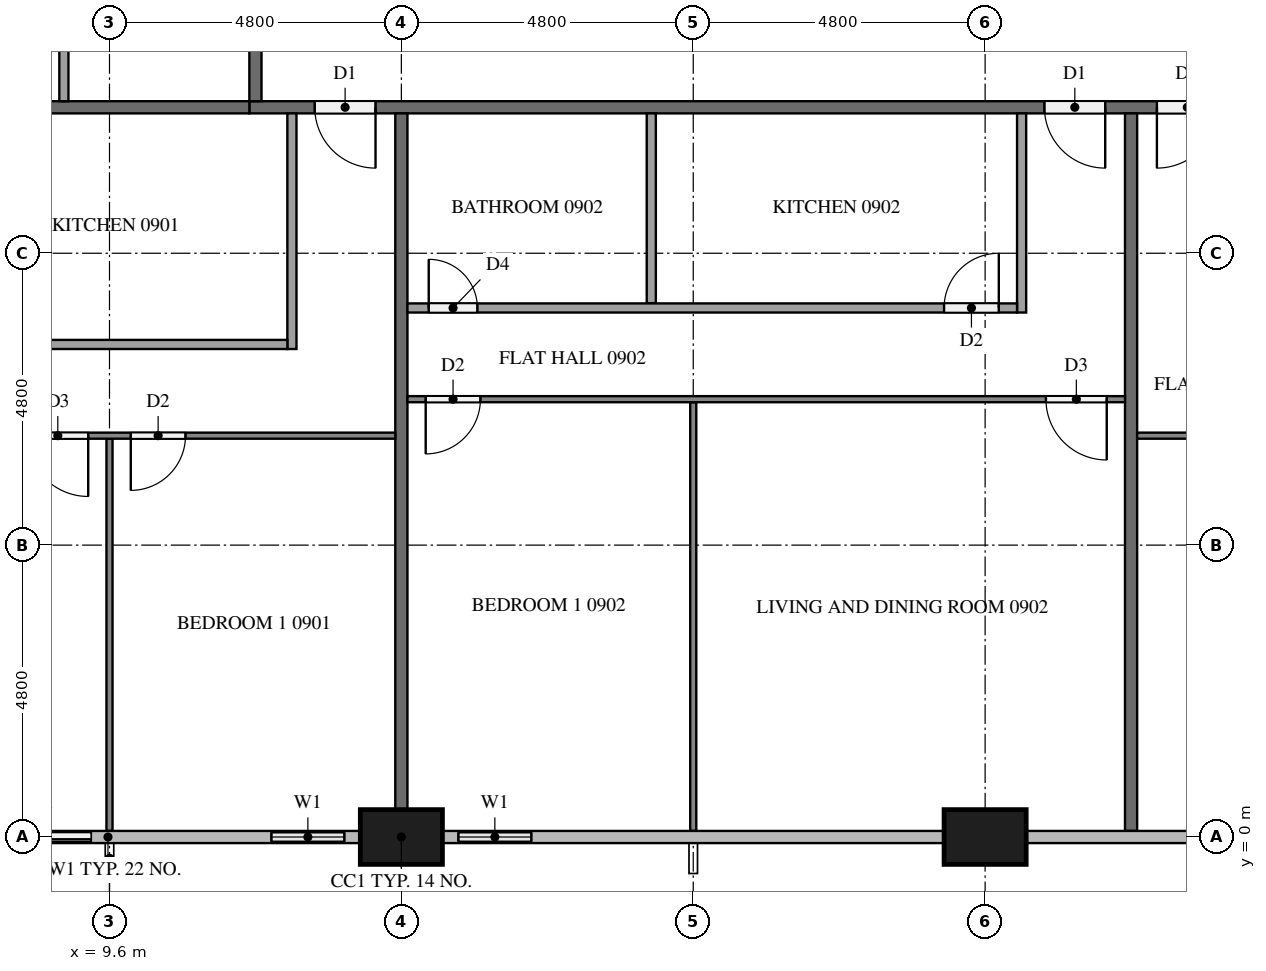
"""IFC4 building model, lengths in metres.
Left out: names, types, materials, properties, quantities, classifications, styles, units other than length and angle.
Written with IfcOpenShell. Run it as: python <this file> out.ifc"""

import sys

from ifc_helpers import new_model, si_unit, direction, frame, frame_2d, origin, origin_2d, place, context, subcontext, project, spatial, rectangle, extrude, element, fill, save


model = new_model("IFC4")
c1 = context("Model", 3, precision=1e-05, world=origin(), true_north=direction((0.0, 1.0)))
c2 = subcontext(c1, "Body", "Model", "MODEL_VIEW")
j1 = project(units=[si_unit("LENGTHUNIT", "METRE"), si_unit("PLANEANGLEUNIT", "RADIAN")], contexts=[c1])
p1 = place(None, origin())
s1 = spatial("IfcSite", under=j1, at=p1, CompositionType="ELEMENT")
p2 = place(p1, origin())
s2 = spatial("IfcBuilding", under=s1, at=p2, CompositionType="ELEMENT")
p3 = place(p2, frame((0.0, 0.0, 39.9)))
s3 = spatial("IfcBuildingStorey", under=s2, at=p3, CompositionType="ELEMENT", Elevation=39.9)
for number, where, z_axis, x_axis in (
    (1, (14.4, 0.0, 0.0), (0.0, 0.0, 1.0), (1.0, 0.0, 0.0)),
    (2, (24.0, 0.0, 0.0), (0.0, 0.0, 1.0), (1.0, 0.0, 0.0)),
):
    element("IfcColumn", number, at=place(p3, frame(where, z_axis=z_axis, x_axis=x_axis)), inside=s3, PredefinedType="COLUMN", context=c2, shape_type="SweptSolid", body=[
        extrude(rectangle(XDim=1.35, YDim=0.9, at=origin_2d()), origin(), (0.0, 0.0, 1.0), 3.2),
    ])
p4 = place(p3, frame((7.2, 0.0, 0.0), z_axis=(0.0, 0.0, 1.0), x_axis=(1.0, 0.0, 0.0)))
e3 = element("IfcWall", 3, at=p4, inside=s3, PredefinedType="SOLIDWALL", context=c2, shape_type="SweptSolid", body=[
    extrude(rectangle(XDim=2.4, YDim=0.15, at=frame_2d((1.2, 0.0))), origin(), (0.0, 0.0, 1.0), 3.2),
])
p5 = place(p4, frame((0.3, 0.0, 0.0)))
e4 = element("IfcOpeningElement", 4, at=p5, cuts=e3, PredefinedType="OPENING", context=c2, shape_type="SweptSolid", body=[
    extrude(rectangle(XDim=1.8, YDim=2.4, at=frame_2d((0.9, 1.2))), frame((0.0, 0.085, 0.0), z_axis=(0.0, -1.0, 0.0), x_axis=(1.0, 0.0, 0.0)), (0.0, 0.0, 1.0), 0.17),
])
p6 = place(p3, frame((12.0, 0.0, 0.0), z_axis=(0.0, 0.0, 1.0), x_axis=(1.0, 0.0, 0.0)))
e5 = element("IfcWall", 5, at=p6, inside=s3, PredefinedType="SOLIDWALL", context=c2, shape_type="SweptSolid", body=[
    extrude(rectangle(XDim=1.725, YDim=0.15, at=frame_2d((0.863, 0.0))), origin(), (0.0, 0.0, 1.0), 3.2),
])
p7 = place(p6, frame((0.262, 0.0, 0.9)))
e6 = element("IfcOpeningElement", 6, at=p7, cuts=e5, PredefinedType="OPENING", context=c2, shape_type="SweptSolid", body=[
    extrude(rectangle(XDim=1.2, YDim=1.4, at=frame_2d((0.6, 0.7))), frame((0.0, 0.085, 0.0), z_axis=(0.0, -1.0, 0.0), x_axis=(1.0, 0.0, 0.0)), (0.0, 0.0, 1.0), 0.17),
])
p8 = place(p3, frame((15.075, 0.0, 0.0), z_axis=(0.0, 0.0, 1.0), x_axis=(1.0, 0.0, 0.0)))
e7 = element("IfcWall", 7, at=p8, inside=s3, PredefinedType="SOLIDWALL", context=c2, shape_type="SweptSolid", body=[
    extrude(rectangle(XDim=1.725, YDim=0.15, at=frame_2d((0.863, 0.0))), origin(), (0.0, 0.0, 1.0), 3.2),
])
p9 = place(p8, frame((0.262, 0.0, 0.9)))
e8 = element("IfcOpeningElement", 8, at=p9, cuts=e7, PredefinedType="OPENING", context=c2, shape_type="SweptSolid", body=[
    extrude(rectangle(XDim=1.2, YDim=1.4, at=frame_2d((0.6, 0.7))), frame((0.0, 0.085, 0.0), z_axis=(0.0, -1.0, 0.0), x_axis=(1.0, 0.0, 0.0)), (0.0, 0.0, 1.0), 0.17),
])
p10 = place(p3, frame((50.5, 12.0, 0.0), z_axis=(0.0, 0.0, 1.0), x_axis=(-1.0, 0.0, 0.0)))
e9 = element("IfcWall", 9, at=p10, inside=s3, PredefinedType="PARTITIONING", context=c2, shape_type="SweptSolid", body=[
    extrude(rectangle(XDim=38.6, YDim=0.2, at=frame_2d((19.3, 0.0))), origin(), (0.0, 0.0, 1.0), 3.2),
])
p11 = place(p10, frame((36.525, 0.0, 0.0)))
e10 = element("IfcOpeningElement", 10, at=p11, cuts=e9, PredefinedType="OPENING", context=c2, shape_type="SweptSolid", body=[
    extrude(rectangle(XDim=1.0, YDim=2.1, at=frame_2d((0.5, 1.05))), frame((0.0, 0.11, 0.0), z_axis=(0.0, -1.0, 0.0), x_axis=(1.0, 0.0, 0.0)), (0.0, 0.0, 1.0), 0.22),
])
p12 = place(p10, frame((24.525, 0.0, 0.0)))
e11 = element("IfcOpeningElement", 11, at=p12, cuts=e9, PredefinedType="OPENING", context=c2, shape_type="SweptSolid", body=[
    extrude(rectangle(XDim=1.0, YDim=2.1, at=frame_2d((0.5, 1.05))), frame((0.0, 0.11, 0.0), z_axis=(0.0, -1.0, 0.0), x_axis=(1.0, 0.0, 0.0)), (0.0, 0.0, 1.0), 0.22),
])
p13 = place(p10, frame((22.675, 0.0, 0.0)))
e12 = element("IfcOpeningElement", 12, at=p13, cuts=e9, PredefinedType="OPENING", context=c2, shape_type="SweptSolid", body=[
    extrude(rectangle(XDim=1.0, YDim=2.1, at=frame_2d((0.5, 1.05))), frame((0.0, 0.11, 0.0), z_axis=(0.0, -1.0, 0.0), x_axis=(1.0, 0.0, 0.0)), (0.0, 0.0, 1.0), 0.22),
])
p14 = place(p10, frame((8.275, 0.0, 0.0)))
e13 = element("IfcOpeningElement", 13, at=p14, cuts=e9, PredefinedType="OPENING", context=c2, shape_type="SweptSolid", body=[
    extrude(rectangle(XDim=1.0, YDim=2.1, at=frame_2d((0.5, 1.05))), frame((0.0, 0.11, 0.0), z_axis=(0.0, -1.0, 0.0), x_axis=(1.0, 0.0, 0.0)), (0.0, 0.0, 1.0), 0.22),
])
p15 = place(p3, frame((12.0, 12.1, 0.0), z_axis=(0.0, 0.0, 1.0), x_axis=(0.0, 1.0, 0.0)))
e14 = element("IfcWall", 14, at=p15, inside=s3, PredefinedType="PARTITIONING", context=c2, shape_type="SweptSolid", body=[
    extrude(rectangle(XDim=28.6, YDim=0.2, at=frame_2d((14.3, 0.0))), origin(), (0.0, 0.0, 1.0), 3.2),
])
p16 = place(p15, frame((26.725, 0.0, 0.0)))
e15 = element("IfcOpeningElement", 15, at=p16, cuts=e14, PredefinedType="OPENING", context=c2, shape_type="SweptSolid", body=[
    extrude(rectangle(XDim=1.0, YDim=2.1, at=frame_2d((0.5, 1.05))), frame((0.0, 0.11, 0.0), z_axis=(0.0, -1.0, 0.0), x_axis=(1.0, 0.0, 0.0)), (0.0, 0.0, 1.0), 0.22),
])
p17 = place(p15, frame((17.125, 0.0, 0.0)))
e16 = element("IfcOpeningElement", 16, at=p17, cuts=e14, PredefinedType="OPENING", context=c2, shape_type="SweptSolid", body=[
    extrude(rectangle(XDim=1.0, YDim=2.1, at=frame_2d((0.5, 1.05))), frame((0.0, 0.11, 0.0), z_axis=(0.0, -1.0, 0.0), x_axis=(1.0, 0.0, 0.0)), (0.0, 0.0, 1.0), 0.22),
])
p18 = place(p15, frame((15.275, 0.0, 0.0)))
e17 = element("IfcOpeningElement", 17, at=p18, cuts=e14, PredefinedType="OPENING", context=c2, shape_type="SweptSolid", body=[
    extrude(rectangle(XDim=1.0, YDim=2.1, at=frame_2d((0.5, 1.05))), frame((0.0, 0.11, 0.0), z_axis=(0.0, -1.0, 0.0), x_axis=(1.0, 0.0, 0.0)), (0.0, 0.0, 1.0), 0.22),
])
p19 = place(p15, frame((5.675, 0.0, 0.0)))
e18 = element("IfcOpeningElement", 18, at=p19, cuts=e14, PredefinedType="OPENING", context=c2, shape_type="SweptSolid", body=[
    extrude(rectangle(XDim=1.0, YDim=2.1, at=frame_2d((0.5, 1.05))), frame((0.0, 0.11, 0.0), z_axis=(0.0, -1.0, 0.0), x_axis=(1.0, 0.0, 0.0)), (0.0, 0.0, 1.0), 0.22),
])
p20 = place(p3, frame((14.4, 11.9, 0.0), z_axis=(0.0, 0.0, 1.0), x_axis=(0.0, -1.0, 0.0)))
e19 = element("IfcWall", 19, at=p20, inside=s3, PredefinedType="PARTITIONING", context=c2, shape_type="SweptSolid", body=[
    extrude(rectangle(XDim=11.45, YDim=0.2, at=frame_2d((5.725, 0.0))), origin(), (0.0, 0.0, 1.0), 3.2),
])
for number, where, z_axis, x_axis in (
    (20, (0.1, 12.0, 0.0), (0.0, 0.0, 1.0), (1.0, 0.0, 0.0)),
    (21, (26.4, 11.9, 0.0), (0.0, 0.0, 1.0), (0.0, -1.0, 0.0)),
):
    element("IfcWall", number, at=place(p3, frame(where, z_axis=z_axis, x_axis=x_axis)), inside=s3, PredefinedType="PARTITIONING", context=c2, shape_type="SweptSolid", body=[
        extrude(rectangle(XDim=11.8, YDim=0.2, at=frame_2d((5.9, 0.0))), origin(), (0.0, 0.0, 1.0), 3.2),
    ])
p21 = place(p3, frame((9.6, 6.55, 0.0), z_axis=(0.0, 0.0, 1.0), x_axis=(0.0, -1.0, 0.0)))
e22 = element("IfcWall", 22, at=p21, inside=s3, PredefinedType="PARTITIONING", context=c2, shape_type="SweptSolid", body=[
    extrude(rectangle(XDim=6.45, YDim=0.1, at=frame_2d((3.225, 0.0))), origin(), (0.0, 0.0, 1.0), 3.2),
])
p22 = place(p3, frame((14.3, 6.6, 0.0), z_axis=(0.0, 0.0, 1.0), x_axis=(-1.0, 0.0, 0.0)))
e23 = element("IfcWall", 23, at=p22, inside=s3, PredefinedType="PARTITIONING", context=c2, shape_type="SweptSolid", body=[
    extrude(rectangle(XDim=14.2, YDim=0.1, at=frame_2d((7.1, 0.0))), origin(), (0.0, 0.0, 1.0), 3.2),
])
p23 = place(p22, frame((3.45, 0.0, 0.0)))
e24 = element("IfcOpeningElement", 24, at=p23, cuts=e23, PredefinedType="OPENING", context=c2, shape_type="SweptSolid", body=[
    extrude(rectangle(XDim=0.9, YDim=2.1, at=frame_2d((0.45, 1.05))), frame((0.0, 0.06, 0.0), z_axis=(0.0, -1.0, 0.0), x_axis=(1.0, 0.0, 0.0)), (0.0, 0.0, 1.0), 0.12),
])
p24 = place(p22, frame((5.05, 0.0, 0.0)))
e25 = element("IfcOpeningElement", 25, at=p24, cuts=e23, PredefinedType="OPENING", context=c2, shape_type="SweptSolid", body=[
    extrude(rectangle(XDim=1.0, YDim=2.1, at=frame_2d((0.5, 1.05))), frame((0.0, 0.06, 0.0), z_axis=(0.0, -1.0, 0.0), x_axis=(1.0, 0.0, 0.0)), (0.0, 0.0, 1.0), 0.12),
])
p25 = place(p22, frame((12.7, 0.0, 0.0)))
e26 = element("IfcOpeningElement", 26, at=p25, cuts=e23, PredefinedType="OPENING", context=c2, shape_type="SweptSolid", body=[
    extrude(rectangle(XDim=0.9, YDim=2.1, at=frame_2d((0.45, 1.05))), frame((0.0, 0.06, 0.0), z_axis=(0.0, -1.0, 0.0), x_axis=(1.0, 0.0, 0.0)), (0.0, 0.0, 1.0), 0.12),
])
p26 = place(p3, frame((12.6, 11.9, 0.0), z_axis=(0.0, 0.0, 1.0), x_axis=(0.0, -1.0, 0.0)))
e27 = element("IfcWall", 27, at=p26, inside=s3, PredefinedType="PARTITIONING", context=c2, shape_type="SweptSolid", body=[
    extrude(rectangle(XDim=3.875, YDim=0.15, at=frame_2d((1.938, 0.0))), origin(), (0.0, 0.0, 1.0), 3.2),
])
p27 = place(p3, frame((0.1, 8.1, 0.0), z_axis=(0.0, 0.0, 1.0), x_axis=(1.0, 0.0, 0.0)))
e28 = element("IfcWall", 28, at=p27, inside=s3, PredefinedType="PARTITIONING", context=c2, shape_type="SweptSolid", body=[
    extrude(rectangle(XDim=12.425, YDim=0.15, at=frame_2d((6.212, 0.0))), origin(), (0.0, 0.0, 1.0), 3.2),
])
p28 = place(p27, frame((7.015, 0.0, 0.0)))
e29 = element("IfcOpeningElement", 29, at=p28, cuts=e28, PredefinedType="OPENING", context=c2, shape_type="SweptSolid", body=[
    extrude(rectangle(XDim=0.9, YDim=2.1, at=frame_2d((0.45, 1.05))), frame((0.0, 0.085, 0.0), z_axis=(0.0, -1.0, 0.0), x_axis=(1.0, 0.0, 0.0)), (0.0, 0.0, 1.0), 0.17),
])
p29 = place(p27, frame((5.465, 0.0, 0.0)))
e30 = element("IfcOpeningElement", 30, at=p29, cuts=e28, PredefinedType="OPENING", context=c2, shape_type="SweptSolid", body=[
    extrude(rectangle(XDim=0.9, YDim=2.1, at=frame_2d((0.45, 1.05))), frame((0.0, 0.085, 0.0), z_axis=(0.0, -1.0, 0.0), x_axis=(1.0, 0.0, 0.0)), (0.0, 0.0, 1.0), 0.17),
])
p30 = place(p27, frame((0.35, 0.0, 0.0)))
e31 = element("IfcOpeningElement", 31, at=p30, cuts=e28, PredefinedType="OPENING", context=c2, shape_type="SweptSolid", body=[
    extrude(rectangle(XDim=0.8, YDim=2.1, at=frame_2d((0.4, 1.05))), frame((0.0, 0.085, 0.0), z_axis=(0.0, -1.0, 0.0), x_axis=(1.0, 0.0, 0.0)), (0.0, 0.0, 1.0), 0.17),
])
p31 = place(p3, frame((19.2, 7.15, 0.0), z_axis=(0.0, 0.0, 1.0), x_axis=(0.0, -1.0, 0.0)))
e32 = element("IfcWall", 32, at=p31, inside=s3, PredefinedType="PARTITIONING", context=c2, shape_type="SweptSolid", body=[
    extrude(rectangle(XDim=7.05, YDim=0.1, at=frame_2d((3.525, 0.0))), origin(), (0.0, 0.0, 1.0), 3.2),
])
p32 = place(p3, frame((26.3, 7.2, 0.0), z_axis=(0.0, 0.0, 1.0), x_axis=(-1.0, 0.0, 0.0)))
e33 = element("IfcWall", 33, at=p32, inside=s3, PredefinedType="PARTITIONING", context=c2, shape_type="SweptSolid", body=[
    extrude(rectangle(XDim=11.8, YDim=0.1, at=frame_2d((5.9, 0.0))), origin(), (0.0, 0.0, 1.0), 3.2),
])
p33 = place(p32, frame((0.3, 0.0, 0.0)))
e34 = element("IfcOpeningElement", 34, at=p33, cuts=e33, PredefinedType="OPENING", context=c2, shape_type="SweptSolid", body=[
    extrude(rectangle(XDim=1.0, YDim=2.1, at=frame_2d((0.5, 1.05))), frame((0.0, 0.06, 0.0), z_axis=(0.0, -1.0, 0.0), x_axis=(1.0, 0.0, 0.0)), (0.0, 0.0, 1.0), 0.12),
])
p34 = place(p32, frame((10.6, 0.0, 0.0)))
e35 = element("IfcOpeningElement", 35, at=p34, cuts=e33, PredefinedType="OPENING", context=c2, shape_type="SweptSolid", body=[
    extrude(rectangle(XDim=0.9, YDim=2.1, at=frame_2d((0.45, 1.05))), frame((0.0, 0.06, 0.0), z_axis=(0.0, -1.0, 0.0), x_axis=(1.0, 0.0, 0.0)), (0.0, 0.0, 1.0), 0.12),
])
p35 = place(p3, frame((18.51, 11.9, 0.0), z_axis=(0.0, 0.0, 1.0), x_axis=(0.0, -1.0, 0.0)))
e36 = element("IfcWall", 36, at=p35, inside=s3, PredefinedType="PARTITIONING", context=c2, shape_type="SweptSolid", body=[
    extrude(rectangle(XDim=3.125, YDim=0.15, at=frame_2d((1.562, 0.0))), origin(), (0.0, 0.0, 1.0), 3.2),
])
p36 = place(p3, frame((24.6, 11.9, 0.0), z_axis=(0.0, 0.0, 1.0), x_axis=(0.0, -1.0, 0.0)))
e37 = element("IfcWall", 37, at=p36, inside=s3, PredefinedType="PARTITIONING", context=c2, shape_type="SweptSolid", body=[
    extrude(rectangle(XDim=3.275, YDim=0.15, at=frame_2d((1.637, 0.0))), origin(), (0.0, 0.0, 1.0), 3.2),
])
p37 = place(p3, frame((14.5, 8.7, 0.0), z_axis=(0.0, 0.0, 1.0), x_axis=(1.0, 0.0, 0.0)))
e38 = element("IfcWall", 38, at=p37, inside=s3, PredefinedType="PARTITIONING", context=c2, shape_type="SweptSolid", body=[
    extrude(rectangle(XDim=10.025, YDim=0.15, at=frame_2d((5.012, 0.0))), origin(), (0.0, 0.0, 1.0), 3.2),
])
p38 = place(p37, frame((8.825, 0.0, 0.0)))
e39 = element("IfcOpeningElement", 39, at=p38, cuts=e38, PredefinedType="OPENING", context=c2, shape_type="SweptSolid", body=[
    extrude(rectangle(XDim=0.9, YDim=2.1, at=frame_2d((0.45, 1.05))), frame((0.0, 0.085, 0.0), z_axis=(0.0, -1.0, 0.0), x_axis=(1.0, 0.0, 0.0)), (0.0, 0.0, 1.0), 0.17),
])
p39 = place(p37, frame((0.35, 0.0, 0.0)))
e40 = element("IfcOpeningElement", 40, at=p39, cuts=e38, PredefinedType="OPENING", context=c2, shape_type="SweptSolid", body=[
    extrude(rectangle(XDim=0.8, YDim=2.1, at=frame_2d((0.4, 1.05))), frame((0.0, 0.085, 0.0), z_axis=(0.0, -1.0, 0.0), x_axis=(1.0, 0.0, 0.0)), (0.0, 0.0, 1.0), 0.17),
])
p40 = place(p3, frame((40.7, 6.6, 0.0), z_axis=(0.0, 0.0, 1.0), x_axis=(-1.0, 0.0, 0.0)))
e41 = element("IfcWall", 41, at=p40, inside=s3, PredefinedType="PARTITIONING", context=c2, shape_type="SweptSolid", body=[
    extrude(rectangle(XDim=14.2, YDim=0.1, at=frame_2d((7.1, 0.0))), origin(), (0.0, 0.0, 1.0), 3.2),
])
p41 = place(p40, frame((9.85, 0.0, 0.0)))
e42 = element("IfcOpeningElement", 42, at=p41, cuts=e41, PredefinedType="OPENING", context=c2, shape_type="SweptSolid", body=[
    extrude(rectangle(XDim=0.9, YDim=2.1, at=frame_2d((0.45, 1.05))), frame((0.0, 0.06, 0.0), z_axis=(0.0, -1.0, 0.0), x_axis=(1.0, 0.0, 0.0)), (0.0, 0.0, 1.0), 0.12),
])
p42 = place(p40, frame((8.25, 0.0, 0.0)))
e43 = element("IfcOpeningElement", 43, at=p42, cuts=e41, PredefinedType="OPENING", context=c2, shape_type="SweptSolid", body=[
    extrude(rectangle(XDim=0.9, YDim=2.1, at=frame_2d((0.45, 1.05))), frame((0.0, 0.06, 0.0), z_axis=(0.0, -1.0, 0.0), x_axis=(1.0, 0.0, 0.0)), (0.0, 0.0, 1.0), 0.12),
])
p43 = place(p40, frame((0.3, 0.0, 0.0)))
e44 = element("IfcOpeningElement", 44, at=p43, cuts=e41, PredefinedType="OPENING", context=c2, shape_type="SweptSolid", body=[
    extrude(rectangle(XDim=1.0, YDim=2.1, at=frame_2d((0.5, 1.05))), frame((0.0, 0.06, 0.0), z_axis=(0.0, -1.0, 0.0), x_axis=(1.0, 0.0, 0.0)), (0.0, 0.0, 1.0), 0.12),
])
p44 = place(p3, frame((8.85, 17.325, 0.0), z_axis=(0.0, 0.0, 1.0), x_axis=(0.0, -1.0, 0.0)))
e45 = element("IfcWall", 45, at=p44, inside=s3, PredefinedType="PARTITIONING", context=c2, shape_type="SweptSolid", body=[
    extrude(rectangle(XDim=5.225, YDim=0.15, at=frame_2d((2.612, 0.0))), origin(), (0.0, 0.0, 1.0), 3.2),
])
p45 = place(p44, frame((0.965, 0.0, 0.0)))
e46 = element("IfcOpeningElement", 46, at=p45, cuts=e45, PredefinedType="OPENING", context=c2, shape_type="SweptSolid", body=[
    extrude(rectangle(XDim=0.8, YDim=2.1, at=frame_2d((0.4, 1.05))), frame((0.0, 0.085, 0.0), z_axis=(0.0, -1.0, 0.0), x_axis=(1.0, 0.0, 0.0)), (0.0, 0.0, 1.0), 0.17),
])
p46 = place(p44, frame((2.415, 0.0, 0.0)))
e47 = element("IfcOpeningElement", 47, at=p46, cuts=e45, PredefinedType="OPENING", context=c2, shape_type="SweptSolid", body=[
    extrude(rectangle(XDim=0.9, YDim=2.1, at=frame_2d((0.45, 1.05))), frame((0.0, 0.085, 0.0), z_axis=(0.0, -1.0, 0.0), x_axis=(1.0, 0.0, 0.0)), (0.0, 0.0, 1.0), 0.17),
])
p47 = place(p5, origin())
e48 = element("IfcDoor", 48, at=p47, inside=s3, OperationType="SLIDING_TO_LEFT", PredefinedType="DOOR", context=c2, shape_type="SweptSolid", body=[
    extrude(rectangle(XDim=1.8, YDim=2.4, at=frame_2d((0.9, 1.2))), frame((0.0, 0.025, 0.0), z_axis=(0.0, -1.0, 0.0), x_axis=(1.0, 0.0, 0.0)), (0.0, 0.0, 1.0), 0.05),
])
fill(e4, e48)
p48 = place(p7, origin())
e49 = element("IfcWindow", 49, at=p48, inside=s3, PartitioningType="SINGLE_PANEL", PredefinedType="WINDOW", context=c2, shape_type="SweptSolid", body=[
    extrude(rectangle(XDim=1.2, YDim=1.4, at=frame_2d((0.6, 0.7))), frame((0.0, 0.03, 0.0), z_axis=(0.0, -1.0, 0.0), x_axis=(1.0, 0.0, 0.0)), (0.0, 0.0, 1.0), 0.06),
])
fill(e6, e49)
p49 = place(p9, origin())
e50 = element("IfcWindow", 50, at=p49, inside=s3, PartitioningType="SINGLE_PANEL", PredefinedType="WINDOW", context=c2, shape_type="SweptSolid", body=[
    extrude(rectangle(XDim=1.2, YDim=1.4, at=frame_2d((0.6, 0.7))), frame((0.0, 0.03, 0.0), z_axis=(0.0, -1.0, 0.0), x_axis=(1.0, 0.0, 0.0)), (0.0, 0.0, 1.0), 0.06),
])
fill(e8, e50)
p50 = place(p11, origin())
e51 = element("IfcDoor", 51, at=p50, inside=s3, OperationType="SINGLE_SWING_LEFT", PredefinedType="DOOR", context=c2, shape_type="SweptSolid", body=[
    extrude(rectangle(XDim=1.0, YDim=2.1, at=frame_2d((0.5, 1.05))), frame((0.0, 0.025, 0.0), z_axis=(0.0, -1.0, 0.0), x_axis=(1.0, 0.0, 0.0)), (0.0, 0.0, 1.0), 0.05),
])
fill(e10, e51)
p51 = place(p12, origin())
e52 = element("IfcDoor", 52, at=p51, inside=s3, OperationType="SINGLE_SWING_LEFT", PredefinedType="DOOR", context=c2, shape_type="SweptSolid", body=[
    extrude(rectangle(XDim=1.0, YDim=2.1, at=frame_2d((0.5, 1.05))), frame((0.0, 0.025, 0.0), z_axis=(0.0, -1.0, 0.0), x_axis=(1.0, 0.0, 0.0)), (0.0, 0.0, 1.0), 0.05),
])
fill(e11, e52)
p52 = place(p13, origin())
e53 = element("IfcDoor", 53, at=p52, inside=s3, OperationType="SINGLE_SWING_RIGHT", PredefinedType="DOOR", context=c2, shape_type="SweptSolid", body=[
    extrude(rectangle(XDim=1.0, YDim=2.1, at=frame_2d((0.5, 1.05))), frame((0.0, 0.025, 0.0), z_axis=(0.0, -1.0, 0.0), x_axis=(1.0, 0.0, 0.0)), (0.0, 0.0, 1.0), 0.05),
])
fill(e12, e53)
p53 = place(p23, origin())
e54 = element("IfcDoor", 54, at=p53, inside=s3, OperationType="SINGLE_SWING_RIGHT", PredefinedType="DOOR", context=c2, shape_type="SweptSolid", body=[
    extrude(rectangle(XDim=0.9, YDim=2.1, at=frame_2d((0.45, 1.05))), frame((0.0, 0.025, 0.0), z_axis=(0.0, -1.0, 0.0), x_axis=(1.0, 0.0, 0.0)), (0.0, 0.0, 1.0), 0.05),
])
fill(e24, e54)
p54 = place(p24, origin())
e55 = element("IfcDoor", 55, at=p54, inside=s3, OperationType="SINGLE_SWING_LEFT", PredefinedType="DOOR", context=c2, shape_type="SweptSolid", body=[
    extrude(rectangle(XDim=1.0, YDim=2.1, at=frame_2d((0.5, 1.05))), frame((0.0, 0.025, 0.0), z_axis=(0.0, -1.0, 0.0), x_axis=(1.0, 0.0, 0.0)), (0.0, 0.0, 1.0), 0.05),
])
fill(e25, e55)
p55 = place(p33, origin())
e56 = element("IfcDoor", 56, at=p55, inside=s3, OperationType="SINGLE_SWING_LEFT", PredefinedType="DOOR", context=c2, shape_type="SweptSolid", body=[
    extrude(rectangle(XDim=1.0, YDim=2.1, at=frame_2d((0.5, 1.05))), frame((0.0, 0.025, 0.0), z_axis=(0.0, -1.0, 0.0), x_axis=(1.0, 0.0, 0.0)), (0.0, 0.0, 1.0), 0.05),
])
fill(e34, e56)
p56 = place(p34, origin())
e57 = element("IfcDoor", 57, at=p56, inside=s3, OperationType="SINGLE_SWING_RIGHT", PredefinedType="DOOR", context=c2, shape_type="SweptSolid", body=[
    extrude(rectangle(XDim=0.9, YDim=2.1, at=frame_2d((0.45, 1.05))), frame((0.0, 0.025, 0.0), z_axis=(0.0, -1.0, 0.0), x_axis=(1.0, 0.0, 0.0)), (0.0, 0.0, 1.0), 0.05),
])
fill(e35, e57)
p57 = place(p38, origin())
e58 = element("IfcDoor", 58, at=p57, inside=s3, OperationType="SINGLE_SWING_RIGHT", PredefinedType="DOOR", context=c2, shape_type="SweptSolid", body=[
    extrude(rectangle(XDim=0.9, YDim=2.1, at=frame_2d((0.45, 1.05))), frame((0.0, 0.025, 0.0), z_axis=(0.0, -1.0, 0.0), x_axis=(1.0, 0.0, 0.0)), (0.0, 0.0, 1.0), 0.05),
])
fill(e39, e58)
p58 = place(p39, origin())
e59 = element("IfcDoor", 59, at=p58, inside=s3, OperationType="SINGLE_SWING_LEFT", PredefinedType="DOOR", context=c2, shape_type="SweptSolid", body=[
    extrude(rectangle(XDim=0.8, YDim=2.1, at=frame_2d((0.4, 1.05))), frame((0.0, 0.025, 0.0), z_axis=(0.0, -1.0, 0.0), x_axis=(1.0, 0.0, 0.0)), (0.0, 0.0, 1.0), 0.05),
])
fill(e40, e59)
save(model, sys.argv[1])
